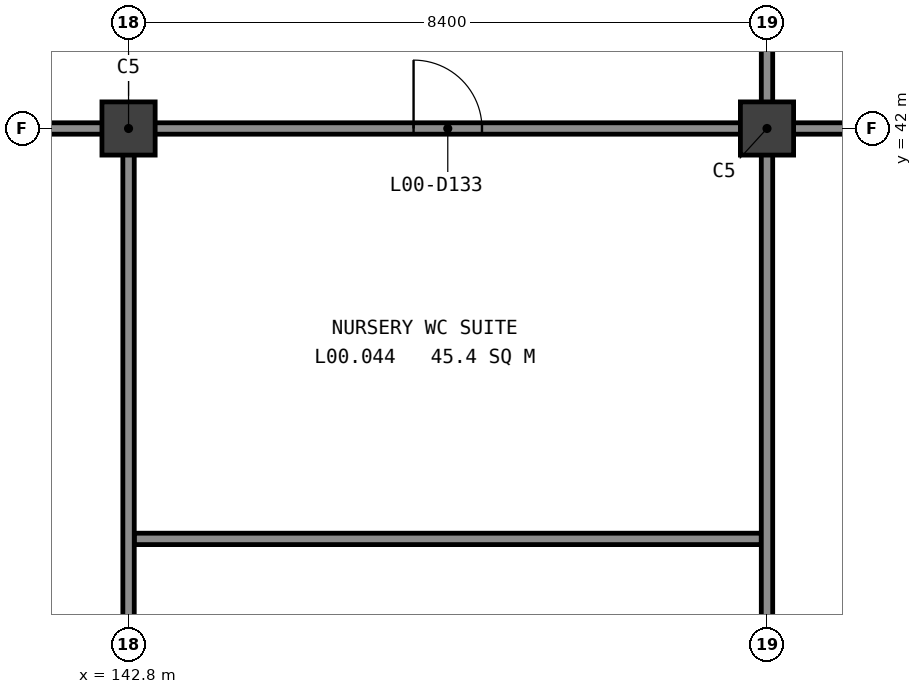
"""IFC4 building model, lengths in metres.
Left out: names, types, materials, properties, quantities, classifications, styles, units other than length and angle.
Written with IfcOpenShell. Run it as: python <this file> out.ifc"""

import sys

from ifc_helpers import new_model, si_unit, direction, frame, frame_2d, origin, origin_2d, place, context, subcontext, project, spatial, rectangle, extrude, element, fill, save


model = new_model("IFC4")
c1 = context("Model", 3, precision=1e-05, world=origin(), true_north=direction((0.0, 1.0)))
c2 = subcontext(c1, "Body", "Model", "MODEL_VIEW")
j1 = project(units=[si_unit("LENGTHUNIT", "METRE"), si_unit("PLANEANGLEUNIT", "RADIAN")], contexts=[c1])
p1 = place(None, origin())
s1 = spatial("IfcSite", under=j1, at=p1, CompositionType="ELEMENT")
p2 = place(p1, origin())
s2 = spatial("IfcBuilding", under=s1, at=p2, CompositionType="ELEMENT")
p3 = place(p2, origin())
s3 = spatial("IfcBuildingStorey", under=s2, at=p3, CompositionType="ELEMENT", Elevation=0.0)
for number, where, z_axis, x_axis in (
    (1, (142.8, 42.0, -0.3), (0.0, 0.0, 1.0), (1.0, 0.0, 0.0)),
    (2, (151.2, 42.0, -0.3), (0.0, 0.0, 1.0), (1.0, 0.0, 0.0)),
):
    element("IfcColumn", number, at=place(p3, frame(where, z_axis=z_axis, x_axis=x_axis)), inside=s3, PredefinedType="COLUMN", context=c2, shape_type="SweptSolid", body=[
        extrude(rectangle(XDim=0.7, YDim=0.7, at=origin_2d()), origin(), (0.0, 0.0, 1.0), 5.4),
    ])
p4 = place(p3, frame((142.875, 36.6, 0.0), z_axis=(0.0, 0.0, 1.0), x_axis=(1.0, 0.0, 0.0)))
e3 = element("IfcWall", 3, at=p4, inside=s3, PredefinedType="PARTITIONING", context=c2, shape_type="SweptSolid", body=[
    extrude(rectangle(XDim=8.25, YDim=0.15, at=frame_2d((4.125, 0.0))), origin(), (0.0, 0.0, 1.0), 5.1),
])
p5 = place(p3, frame((134.5, 42.0, 0.0), z_axis=(0.0, 0.0, 1.0), x_axis=(1.0, 0.0, 0.0)))
e4 = element("IfcWall", 4, at=p5, inside=s3, PredefinedType="PARTITIONING", context=c2, shape_type="SweptSolid", body=[
    extrude(rectangle(XDim=8.63, YDim=0.15, at=frame_2d((4.315, 0.0))), origin(), (0.0, 0.0, 1.0), 5.1),
])
p6 = place(p5, frame((3.65, 0.0, 0.0)))
e5 = element("IfcOpeningElement", 5, at=p6, cuts=e4, PredefinedType="OPENING", context=c2, shape_type="SweptSolid", body=[
    extrude(rectangle(XDim=0.9, YDim=2.25, at=frame_2d((0.45, 1.125))), frame((0.0, 0.085, 0.0), z_axis=(0.0, -1.0, 0.0), x_axis=(1.0, 0.0, 0.0)), (0.0, 0.0, 1.0), 0.17),
])
p7 = place(p3, frame((143.13, 42.0, 0.0), z_axis=(0.0, 0.0, 1.0), x_axis=(1.0, 0.0, 0.0)))
e6 = element("IfcWall", 6, at=p7, inside=s3, PredefinedType="PARTITIONING", context=c2, shape_type="SweptSolid", body=[
    extrude(rectangle(XDim=16.14, YDim=0.15, at=frame_2d((8.07, 0.0))), origin(), (0.0, 0.0, 1.0), 4.3),
])
p8 = place(p7, frame((3.42, 0.0, 0.0)))
e7 = element("IfcOpeningElement", 7, at=p8, cuts=e6, PredefinedType="OPENING", context=c2, shape_type="SweptSolid", body=[
    extrude(rectangle(XDim=0.9, YDim=2.1, at=frame_2d((0.45, 1.05))), frame((0.0, 0.085, 0.0), z_axis=(0.0, -1.0, 0.0), x_axis=(1.0, 0.0, 0.0)), (0.0, 0.0, 1.0), 0.17),
])
p9 = place(p7, frame((13.92, 0.0, 0.0)))
e8 = element("IfcOpeningElement", 8, at=p9, cuts=e6, PredefinedType="OPENING", context=c2, shape_type="SweptSolid", body=[
    extrude(rectangle(XDim=0.9, YDim=2.25, at=frame_2d((0.45, 1.125))), frame((0.0, 0.085, 0.0), z_axis=(0.0, -1.0, 0.0), x_axis=(1.0, 0.0, 0.0)), (0.0, 0.0, 1.0), 0.17),
])
p10 = place(p3, frame((142.8, 27.675, 0.0), z_axis=(0.0, 0.0, 1.0), x_axis=(0.0, 1.0, 0.0)))
e9 = element("IfcWall", 9, at=p10, inside=s3, PredefinedType="PARTITIONING", context=c2, shape_type="SweptSolid", body=[
    extrude(rectangle(XDim=14.25, YDim=0.15, at=frame_2d((7.125, 0.0))), origin(), (0.0, 0.0, 1.0), 4.3),
])
p11 = place(p3, frame((151.2, 27.675, 0.0), z_axis=(0.0, 0.0, 1.0), x_axis=(0.0, 1.0, 0.0)))
e10 = element("IfcWall", 10, at=p11, inside=s3, PredefinedType="PARTITIONING", context=c2, shape_type="SweptSolid", body=[
    extrude(rectangle(XDim=22.65, YDim=0.15, at=frame_2d((11.325, 0.0))), origin(), (0.0, 0.0, 1.0), 4.3),
])
p12 = place(p8, origin())
e11 = element("IfcDoor", 11, at=p12, inside=s3, OperationType="SINGLE_SWING_RIGHT", PredefinedType="DOOR", context=c2, shape_type="SweptSolid", body=[
    extrude(rectangle(XDim=0.9, YDim=2.1, at=frame_2d((0.45, 1.05))), frame((0.0, 0.025, 0.0), z_axis=(0.0, -1.0, 0.0), x_axis=(1.0, 0.0, 0.0)), (0.0, 0.0, 1.0), 0.05),
])
fill(e7, e11)
save(model, sys.argv[1])
